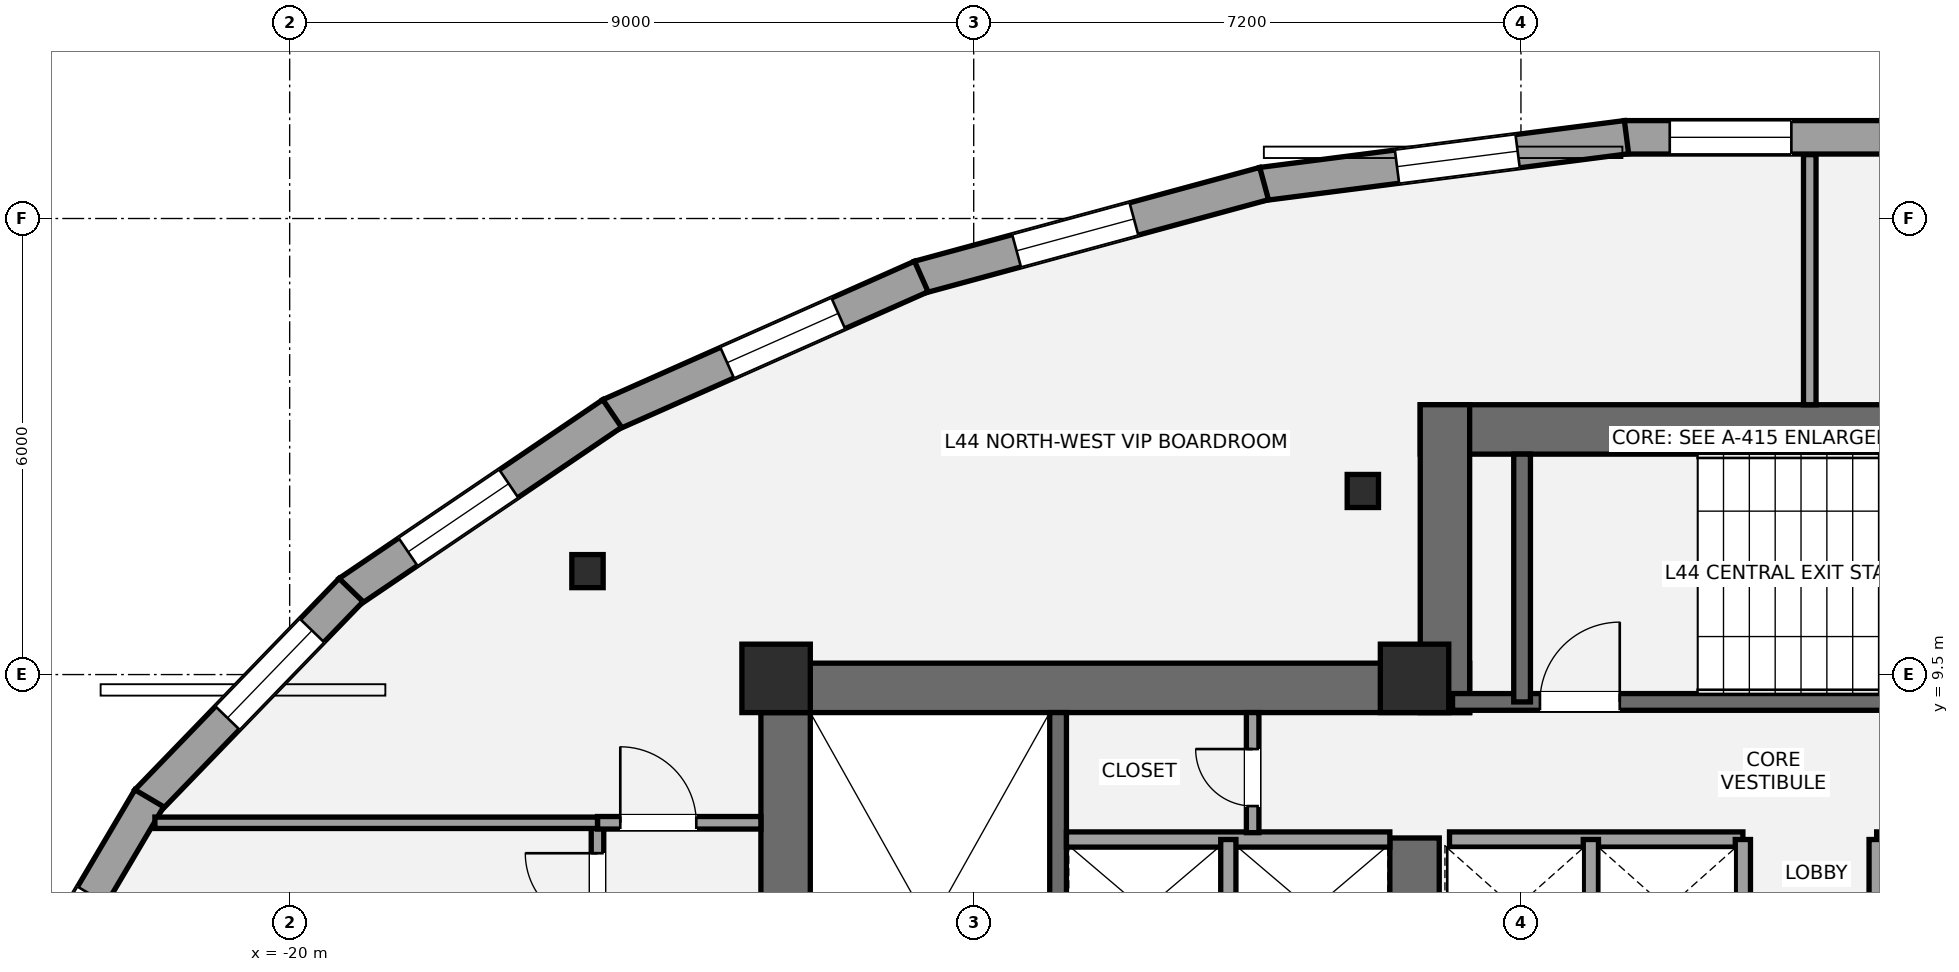
"""IFC4 building model, lengths in metres.
Left out: names, types, materials, properties, quantities, classifications, styles, units other than length and angle.
Written with IfcOpenShell. Run it as: python <this file> out.ifc"""

import sys

from ifc_helpers import new_model, si_unit, direction, frame, frame_2d, origin, origin_2d, place, context, subcontext, project, spatial, rectangle, i_section, extrude, element, fill, save


model = new_model("IFC4")
c1 = context("Model", 3, precision=1e-05, world=origin(), true_north=direction((0.0, 1.0)))
c2 = subcontext(c1, "Body", "Model", "MODEL_VIEW")
j1 = project(units=[si_unit("LENGTHUNIT", "METRE"), si_unit("PLANEANGLEUNIT", "RADIAN")], contexts=[c1])
p1 = place(None, origin())
s1 = spatial("IfcSite", under=j1, at=p1, CompositionType="ELEMENT")
p2 = place(p1, origin())
s2 = spatial("IfcBuilding", under=s1, at=p2, CompositionType="ELEMENT")
p3 = place(p2, frame((0.0, 0.0, 163.0)))
s3 = spatial("IfcBuildingStorey", under=s2, at=p3, CompositionType="ELEMENT", Elevation=163.0)
p4 = place(p3, frame((-13.475, 1.2, 0.0), z_axis=(0.0, 0.0, 1.0), x_axis=(0.0, 1.0, 0.0)))
e1 = element("IfcWall", 1, at=p4, inside=s3, PredefinedType="SHEAR", context=c2, shape_type="SweptSolid", body=[
    extrude(rectangle(XDim=8.45, YDim=0.65, at=frame_2d((4.225, 0.0))), origin(), (0.0, 0.0, 1.0), 3.2),
])
p5 = place(p3, frame((-13.8, 9.325, 0.0), z_axis=(0.0, 0.0, 1.0), x_axis=(1.0, 0.0, 0.0)))
e2 = element("IfcWall", 2, at=p5, inside=s3, PredefinedType="SHEAR", context=c2, shape_type="SweptSolid", body=[
    extrude(rectangle(XDim=9.325, YDim=0.65, at=frame_2d((4.663, 0.0))), origin(), (0.0, 0.0, 1.0), 3.2),
])
p6 = place(p3, frame((-5.2, 5.35, 0.0), z_axis=(0.0, 0.0, 1.0), x_axis=(0.0, 1.0, 0.0)))
e3 = element("IfcWall", 3, at=p6, inside=s3, PredefinedType="SHEAR", context=c2, shape_type="SweptSolid", body=[
    extrude(rectangle(XDim=2.0, YDim=0.65, at=frame_2d((1.0, 0.0))), origin(), (0.0, 0.0, 1.0), 3.2),
])
p7 = place(p3, frame((-9.89, 1.85, 0.0), z_axis=(0.0, 0.0, 1.0), x_axis=(0.0, 1.0, 0.0)))
e4 = element("IfcWall", 4, at=p7, inside=s3, PredefinedType="SHEAR", context=c2, shape_type="SweptSolid", body=[
    extrude(rectangle(XDim=7.15, YDim=0.22, at=frame_2d((3.575, 0.0))), origin(), (0.0, 0.0, 1.0), 3.2),
])
p8 = place(p3, frame((-5.125, 12.725, 0.0), z_axis=(0.0, 0.0, 1.0), x_axis=(1.0, 0.0, 0.0)))
e5 = element("IfcWall", 5, at=p8, inside=s3, PredefinedType="SHEAR", context=c2, shape_type="SweptSolid", body=[
    extrude(rectangle(XDim=10.25, YDim=0.65, at=frame_2d((5.125, 0.0))), origin(), (0.0, 0.0, 1.0), 3.2),
])
p9 = place(p3, frame((-4.8, 9.0, 0.0), z_axis=(0.0, 0.0, 1.0), x_axis=(0.0, 1.0, 0.0)))
e6 = element("IfcWall", 6, at=p9, inside=s3, PredefinedType="SHEAR", context=c2, shape_type="SweptSolid", body=[
    extrude(rectangle(XDim=4.05, YDim=0.65, at=frame_2d((2.025, 0.0))), origin(), (0.0, 0.0, 1.0), 3.2),
])
p10 = place(p3, frame((-4.7, 9.14, 0.0), z_axis=(0.0, 0.0, 1.0), x_axis=(1.0, 0.0, 0.0)))
e7 = element("IfcWall", 7, at=p10, inside=s3, PredefinedType="SHEAR", context=c2, shape_type="SweptSolid", body=[
    extrude(rectangle(XDim=9.3, YDim=0.22, at=frame_2d((4.65, 0.0))), origin(), (0.0, 0.0, 1.0), 3.2),
])
p11 = place(p10, frame((1.15, 0.0, 0.0)))
e8 = element("IfcOpeningElement", 8, at=p11, cuts=e7, PredefinedType="OPENING", context=c2, shape_type="SweptSolid", body=[
    extrude(rectangle(XDim=1.05, YDim=2.15, at=frame_2d((0.525, 1.075))), frame((0.0, 0.12, 0.0), z_axis=(0.0, -1.0, 0.0), x_axis=(1.0, 0.0, 0.0)), (0.0, 0.0, 1.0), 0.24),
])
p12 = place(p3, frame((-3.785, 9.14, 0.0), z_axis=(0.0, 0.0, 1.0), x_axis=(0.0, 1.0, 0.0)))
e9 = element("IfcWall", 9, at=p12, inside=s3, PredefinedType="SHEAR", context=c2, shape_type="SweptSolid", body=[
    extrude(rectangle(XDim=3.26, YDim=0.22, at=frame_2d((1.63, 0.0))), origin(), (0.0, 0.0, 1.0), 3.2),
])
for number, where, z_axis, x_axis in (
    (10, (-13.6, 9.45, 0.0), (0.0, 0.0, 1.0), (1.0, 0.0, 0.0)),
    (11, (-5.2, 9.45, 0.0), (0.0, 0.0, 1.0), (1.0, 0.0, 0.0)),
):
    element("IfcColumn", number, at=place(p3, frame(where, z_axis=z_axis, x_axis=x_axis)), inside=s3, PredefinedType="COLUMN", context=c2, shape_type="SweptSolid", body=[
        extrude(rectangle(XDim=0.9, YDim=0.9, at=origin_2d()), origin(), (0.0, 0.0, 1.0), 3.2),
    ])
for number, where, z_axis, x_axis in (
    (12, (-5.88, 11.915, 0.0), (0.0, 0.0, 1.0), (1.0, 0.0, 0.0)),
    (13, (-16.082, 10.861, 0.0), (0.0, 0.0, 1.0), (1.0, 0.0, 0.0)),
):
    element("IfcColumn", number, at=place(p3, frame(where, z_axis=z_axis, x_axis=x_axis)), inside=s3, PredefinedType="COLUMN", context=c2, shape_type="SweptSolid", body=[
        extrude(i_section(OverallWidth=0.412, OverallDepth=0.435, WebThickness=0.036, FlangeThickness=0.057, at=origin_2d()), origin(), (0.0, 0.0, 1.0), 3.2),
    ])
p13 = place(p3, frame((-2.439, 16.568, 0.0), z_axis=(0.0, 0.0, 1.0), x_axis=(1.0, 0.0, 0.0)))
e14 = element("IfcWall", 14, at=p13, inside=s3, PredefinedType="STANDARD", context=c2, shape_type="SweptSolid", body=[
    extrude(rectangle(XDim=4.878, YDim=0.44, at=frame_2d((2.439, 0.0))), origin(), (0.0, 0.0, 1.0), 2.315),
])
p14 = place(p13, frame((0.597, 0.0, 0.58)))
e15 = element("IfcOpeningElement", 15, at=p14, cuts=e14, PredefinedType="OPENING", context=c2, shape_type="SweptSolid", body=[
    extrude(rectangle(XDim=1.6, YDim=1.55, at=frame_2d((0.8, 0.775))), frame((0.0, 0.23, 0.0), z_axis=(0.0, -1.0, 0.0), x_axis=(1.0, 0.0, 0.0)), (0.0, 0.0, 1.0), 0.46),
])
p15 = place(p3, frame((-7.209, 15.954, 0.0), z_axis=(0.0, 0.0, 1.0), x_axis=(0.991852910824, 0.127388395426, 0.0)))
e16 = element("IfcWall", 16, at=p15, inside=s3, PredefinedType="STANDARD", context=c2, shape_type="SweptSolid", body=[
    extrude(rectangle(XDim=4.837, YDim=0.44, at=frame_2d((2.418, 0.0))), origin(), (0.0, 0.0, 1.0), 2.315),
])
p16 = place(p15, frame((1.793, 0.0, 0.58)))
e17 = element("IfcOpeningElement", 17, at=p16, cuts=e16, PredefinedType="OPENING", context=c2, shape_type="SweptSolid", body=[
    extrude(rectangle(XDim=1.6, YDim=1.55, at=frame_2d((0.8, 0.775))), frame((0.0, 0.23, 0.0), z_axis=(0.0, -1.0, 0.0), x_axis=(1.0, 0.0, 0.0)), (0.0, 0.0, 1.0), 0.46),
])
p17 = place(p3, frame((-11.721, 14.726, 0.0), z_axis=(0.0, 0.0, 1.0), x_axis=(0.965037424263, 0.262112132058, 0.0)))
e18 = element("IfcWall", 18, at=p17, inside=s3, PredefinedType="STANDARD", context=c2, shape_type="SweptSolid", body=[
    extrude(rectangle(XDim=4.707, YDim=0.44, at=frame_2d((2.353, 0.0))), origin(), (0.0, 0.0, 1.0), 2.315),
])
p18 = place(p17, frame((1.332, 0.0, 0.58)))
e19 = element("IfcOpeningElement", 19, at=p18, cuts=e18, PredefinedType="OPENING", context=c2, shape_type="SweptSolid", body=[
    extrude(rectangle(XDim=1.6, YDim=1.55, at=frame_2d((0.8, 0.775))), frame((0.0, 0.23, 0.0), z_axis=(0.0, -1.0, 0.0), x_axis=(1.0, 0.0, 0.0)), (0.0, 0.0, 1.0), 0.46),
])
p19 = place(p3, frame((-15.791, 12.916, 0.0), z_axis=(0.0, 0.0, 1.0), x_axis=(0.913907994914, 0.405921392431, 0.0)))
e20 = element("IfcWall", 20, at=p19, inside=s3, PredefinedType="STANDARD", context=c2, shape_type="SweptSolid", body=[
    extrude(rectangle(XDim=4.487, YDim=0.44, at=frame_2d((2.244, 0.0))), origin(), (0.0, 0.0, 1.0), 2.315),
])
p20 = place(p19, frame((1.692, 0.0, 0.58)))
e21 = element("IfcOpeningElement", 21, at=p20, cuts=e20, PredefinedType="OPENING", context=c2, shape_type="SweptSolid", body=[
    extrude(rectangle(XDim=1.6, YDim=1.55, at=frame_2d((0.8, 0.775))), frame((0.0, 0.23, 0.0), z_axis=(0.0, -1.0, 0.0), x_axis=(1.0, 0.0, 0.0)), (0.0, 0.0, 1.0), 0.46),
])
p21 = place(p3, frame((-19.227, 10.583, 0.0), z_axis=(0.0, 0.0, 1.0), x_axis=(0.827760762475, 0.561081206338, 0.0)))
e22 = element("IfcWall", 22, at=p21, inside=s3, PredefinedType="STANDARD", context=c2, shape_type="SweptSolid", body=[
    extrude(rectangle(XDim=4.192, YDim=0.44, at=frame_2d((2.096, 0.0))), origin(), (0.0, 0.0, 1.0), 2.315),
])
p22 = place(p21, frame((0.947, 0.0, 0.58)))
e23 = element("IfcOpeningElement", 23, at=p22, cuts=e22, PredefinedType="OPENING", context=c2, shape_type="SweptSolid", body=[
    extrude(rectangle(XDim=1.6, YDim=1.55, at=frame_2d((0.8, 0.775))), frame((0.0, 0.23, 0.0), z_axis=(0.0, -1.0, 0.0), x_axis=(1.0, 0.0, 0.0)), (0.0, 0.0, 1.0), 0.46),
])
p23 = place(p3, frame((-21.879, 7.832, 0.0), z_axis=(0.0, 0.0, 1.0), x_axis=(0.694975307772, 0.719033602544, 0.0)))
e24 = element("IfcWall", 24, at=p23, inside=s3, PredefinedType="STANDARD", context=c2, shape_type="SweptSolid", body=[
    extrude(rectangle(XDim=3.866, YDim=0.44, at=frame_2d((1.933, 0.0))), origin(), (0.0, 0.0, 1.0), 2.315),
])
p24 = place(p23, frame((1.526, 0.0, 0.58)))
e25 = element("IfcOpeningElement", 25, at=p24, cuts=e24, PredefinedType="OPENING", context=c2, shape_type="SweptSolid", body=[
    extrude(rectangle(XDim=1.6, YDim=1.55, at=frame_2d((0.8, 0.775))), frame((0.0, 0.23, 0.0), z_axis=(0.0, -1.0, 0.0), x_axis=(1.0, 0.0, 0.0)), (0.0, 0.0, 1.0), 0.46),
])
p25 = place(p3, frame((-23.667, 4.794, 0.0), z_axis=(0.0, 0.0, 1.0), x_axis=(0.508883387051, 0.860835465338, 0.0)))
e26 = element("IfcWall", 26, at=p25, inside=s3, PredefinedType="STANDARD", context=c2, shape_type="SweptSolid", body=[
    extrude(rectangle(XDim=3.577, YDim=0.44, at=frame_2d((1.788, 0.0))), origin(), (0.0, 0.0, 1.0), 2.315),
])
p26 = place(p25, frame((0.496, 0.0, 0.58)))
e27 = element("IfcOpeningElement", 27, at=p26, cuts=e26, PredefinedType="OPENING", context=c2, shape_type="SweptSolid", body=[
    extrude(rectangle(XDim=1.6, YDim=1.55, at=frame_2d((0.8, 0.775))), frame((0.0, 0.23, 0.0), z_axis=(0.0, -1.0, 0.0), x_axis=(1.0, 0.0, 0.0)), (0.0, 0.0, 1.0), 0.46),
])
p27 = place(p3, frame((-9.78, 7.33, 0.0), z_axis=(0.0, 0.0, 1.0), x_axis=(1.0, 0.0, 0.0)))
e28 = element("IfcWall", 28, at=p27, inside=s3, PredefinedType="SOLIDWALL", context=c2, shape_type="SweptSolid", body=[
    extrude(rectangle(XDim=4.255, YDim=0.2, at=frame_2d((2.127, 0.0))), origin(), (0.0, 0.0, 1.0), 3.02),
])
p28 = place(p3, frame((-7.65, 5.47, 0.0), z_axis=(0.0, 0.0, 1.0), x_axis=(0.0, 1.0, 0.0)))
e29 = element("IfcWall", 29, at=p28, inside=s3, PredefinedType="SOLIDWALL", context=c2, shape_type="SweptSolid", body=[
    extrude(rectangle(XDim=1.86, YDim=0.2, at=frame_2d((0.93, 0.0))), origin(), (0.0, 0.0, 1.0), 3.02),
])
for number, where, z_axis, x_axis in (
    (30, (-4.74, 7.33, 0.0), (0.0, 0.0, 1.0), (1.0, 0.0, 0.0)),
    (31, (0.88, 7.33, 0.0), (0.0, 0.0, 1.0), (1.0, 0.0, 0.0)),
):
    element("IfcWall", number, at=place(p3, frame(where, z_axis=z_axis, x_axis=x_axis)), inside=s3, PredefinedType="SOLIDWALL", context=c2, shape_type="SweptSolid", body=[
        extrude(rectangle(XDim=3.86, YDim=0.2, at=frame_2d((1.93, 0.0))), origin(), (0.0, 0.0, 1.0), 3.02),
    ])
for number, where, z_axis, x_axis in (
    (32, (-2.88, 5.52, 0.0), (0.0, 0.0, 1.0), (0.0, 1.0, 0.0)),
    (33, (-0.88, 5.52, 0.0), (0.0, 0.0, 1.0), (0.0, 1.0, 0.0)),
    (34, (0.88, 5.52, 0.0), (0.0, 0.0, 1.0), (0.0, 1.0, 0.0)),
):
    element("IfcWall", number, at=place(p3, frame(where, z_axis=z_axis, x_axis=x_axis)), inside=s3, PredefinedType="SOLIDWALL", context=c2, shape_type="SweptSolid", body=[
        extrude(rectangle(XDim=1.81, YDim=0.2, at=frame_2d((0.905, 0.0))), origin(), (0.0, 0.0, 1.0), 3.02),
    ])
p29 = place(p3, frame((-7.33, 7.42, 0.0), z_axis=(0.0, 0.0, 1.0), x_axis=(0.0, 1.0, 0.0)))
e35 = element("IfcWall", 35, at=p29, inside=s3, PredefinedType="PARTITIONING", context=c2, shape_type="SweptSolid", body=[
    extrude(rectangle(XDim=1.58, YDim=0.165, at=frame_2d((0.79, 0.0))), origin(), (0.0, 0.0, 1.0), 3.02),
])
p30 = place(p29, frame((0.35, 0.0, 0.0)))
e36 = element("IfcOpeningElement", 36, at=p30, cuts=e35, PredefinedType="OPENING", context=c2, shape_type="SweptSolid", body=[
    extrude(rectangle(XDim=0.75, YDim=2.1, at=frame_2d((0.375, 1.05))), frame((0.0, 0.093, 0.0), z_axis=(0.0, -1.0, 0.0), x_axis=(1.0, 0.0, 0.0)), (0.0, 0.0, 1.0), 0.185),
])
p31 = place(p3, frame((-15.95, -12.528, 0.0), z_axis=(0.0, 0.0, 1.0), x_axis=(0.0, 1.0, 0.0)))
e37 = element("IfcWall", 37, at=p31, inside=s3, PredefinedType="PARTITIONING", context=c2, shape_type="SweptSolid", body=[
    extrude(rectangle(XDim=20.078, YDim=0.165, at=frame_2d((10.039, 0.0))), origin(), (0.0, 0.0, 1.0), 2.473),
])
p32 = place(p31, frame((5.528, 0.0, 0.0)))
e38 = element("IfcOpeningElement", 38, at=p32, cuts=e37, PredefinedType="OPENING", context=c2, shape_type="SweptSolid", body=[
    extrude(rectangle(XDim=0.85, YDim=2.1, at=frame_2d((0.425, 1.05))), frame((0.0, 0.093, 0.0), z_axis=(0.0, -1.0, 0.0), x_axis=(1.0, 0.0, 0.0)), (0.0, 0.0, 1.0), 0.185),
])
p33 = place(p31, frame((12.978, 0.0, 0.0)))
e39 = element("IfcOpeningElement", 39, at=p33, cuts=e37, PredefinedType="OPENING", context=c2, shape_type="SweptSolid", body=[
    extrude(rectangle(XDim=0.95, YDim=2.15, at=frame_2d((0.475, 1.075))), frame((0.0, 0.093, 0.0), z_axis=(0.0, -1.0, 0.0), x_axis=(1.0, 0.0, 0.0)), (0.0, 0.0, 1.0), 0.185),
])
p34 = place(p31, frame((18.728, 0.0, 0.0)))
e40 = element("IfcOpeningElement", 40, at=p34, cuts=e37, PredefinedType="OPENING", context=c2, shape_type="SweptSolid", body=[
    extrude(rectangle(XDim=0.95, YDim=2.15, at=frame_2d((0.475, 1.075))), frame((0.0, 0.093, 0.0), z_axis=(0.0, -1.0, 0.0), x_axis=(1.0, 0.0, 0.0)), (0.0, 0.0, 1.0), 0.185),
])
p35 = place(p3, frame((-15.95, 7.55, 0.0), z_axis=(0.0, 0.0, 1.0), x_axis=(1.0, 0.0, 0.0)))
e41 = element("IfcWall", 41, at=p35, inside=s3, PredefinedType="PARTITIONING", context=c2, shape_type="SweptSolid", body=[
    extrude(rectangle(XDim=2.15, YDim=0.165, at=frame_2d((1.075, 0.0))), origin(), (0.0, 0.0, 1.0), 3.02),
])
p36 = place(p35, frame((0.3, 0.0, 0.0)))
e42 = element("IfcOpeningElement", 42, at=p36, cuts=e41, PredefinedType="OPENING", context=c2, shape_type="SweptSolid", body=[
    extrude(rectangle(XDim=1.0, YDim=2.15, at=frame_2d((0.5, 1.075))), frame((0.0, 0.093, 0.0), z_axis=(0.0, -1.0, 0.0), x_axis=(1.0, 0.0, 0.0)), (0.0, 0.0, 1.0), 0.185),
])
p37 = place(p3, frame((-21.773, 7.55, 0.0), z_axis=(0.0, 0.0, 1.0), x_axis=(1.0, 0.0, 0.0)))
e43 = element("IfcWall", 43, at=p37, inside=s3, PredefinedType="PLUMBINGWALL", context=c2, shape_type="SweptSolid", body=[
    extrude(rectangle(XDim=5.823, YDim=0.15, at=frame_2d((2.912, 0.0))), origin(), (0.0, 0.0, 1.0), 2.473),
])
p38 = place(p3, frame((0.0, 13.05, 0.0), z_axis=(0.0, 0.0, 1.0), x_axis=(0.0, 1.0, 0.0)))
e44 = element("IfcWall", 44, at=p38, inside=s3, PredefinedType="PARTITIONING", context=c2, shape_type="SweptSolid", body=[
    extrude(rectangle(XDim=3.29, YDim=0.165, at=frame_2d((1.645, 0.0))), origin(), (0.0, 0.0, 1.0), 3.02),
])
p39 = place(p14, origin())
e45 = element("IfcWindow", 45, at=p39, inside=s3, PartitioningType="SINGLE_PANEL", PredefinedType="WINDOW", context=c2, shape_type="SweptSolid", body=[
    extrude(rectangle(XDim=1.6, YDim=1.55, at=frame_2d((0.8, 0.775))), frame((0.0, -0.01, 0.0), z_axis=(0.0, -1.0, 0.0), x_axis=(1.0, 0.0, 0.0)), (0.0, 0.0, 1.0), 0.06),
])
fill(e15, e45)
p40 = place(p16, origin())
e46 = element("IfcWindow", 46, at=p40, inside=s3, PartitioningType="SINGLE_PANEL", PredefinedType="WINDOW", context=c2, shape_type="SweptSolid", body=[
    extrude(rectangle(XDim=1.6, YDim=1.55, at=frame_2d((0.8, 0.775))), frame((0.0, -0.01, 0.0), z_axis=(0.0, -1.0, 0.0), x_axis=(1.0, 0.0, 0.0)), (0.0, 0.0, 1.0), 0.06),
])
fill(e17, e46)
p41 = place(p18, origin())
e47 = element("IfcWindow", 47, at=p41, inside=s3, PartitioningType="SINGLE_PANEL", PredefinedType="WINDOW", context=c2, shape_type="SweptSolid", body=[
    extrude(rectangle(XDim=1.6, YDim=1.55, at=frame_2d((0.8, 0.775))), frame((0.0, -0.01, 0.0), z_axis=(0.0, -1.0, 0.0), x_axis=(1.0, 0.0, 0.0)), (0.0, 0.0, 1.0), 0.06),
])
fill(e19, e47)
p42 = place(p20, origin())
e48 = element("IfcWindow", 48, at=p42, inside=s3, PartitioningType="SINGLE_PANEL", PredefinedType="WINDOW", context=c2, shape_type="SweptSolid", body=[
    extrude(rectangle(XDim=1.6, YDim=1.55, at=frame_2d((0.8, 0.775))), frame((0.0, -0.01, 0.0), z_axis=(0.0, -1.0, 0.0), x_axis=(1.0, 0.0, 0.0)), (0.0, 0.0, 1.0), 0.06),
])
fill(e21, e48)
p43 = place(p22, origin())
e49 = element("IfcWindow", 49, at=p43, inside=s3, PartitioningType="SINGLE_PANEL", PredefinedType="WINDOW", context=c2, shape_type="SweptSolid", body=[
    extrude(rectangle(XDim=1.6, YDim=1.55, at=frame_2d((0.8, 0.775))), frame((0.0, -0.01, 0.0), z_axis=(0.0, -1.0, 0.0), x_axis=(1.0, 0.0, 0.0)), (0.0, 0.0, 1.0), 0.06),
])
fill(e23, e49)
p44 = place(p24, origin())
e50 = element("IfcWindow", 50, at=p44, inside=s3, PartitioningType="SINGLE_PANEL", PredefinedType="WINDOW", context=c2, shape_type="SweptSolid", body=[
    extrude(rectangle(XDim=1.6, YDim=1.55, at=frame_2d((0.8, 0.775))), frame((0.0, -0.01, 0.0), z_axis=(0.0, -1.0, 0.0), x_axis=(1.0, 0.0, 0.0)), (0.0, 0.0, 1.0), 0.06),
])
fill(e25, e50)
p45 = place(p11, origin())
e51 = element("IfcDoor", 51, at=p45, inside=s3, OperationType="SINGLE_SWING_RIGHT", PredefinedType="DOOR", context=c2, shape_type="SweptSolid", body=[
    extrude(rectangle(XDim=1.05, YDim=2.15, at=frame_2d((0.525, 1.075))), frame((0.0, 0.025, 0.0), z_axis=(0.0, -1.0, 0.0), x_axis=(1.0, 0.0, 0.0)), (0.0, 0.0, 1.0), 0.05),
])
fill(e8, e51)
p46 = place(p30, origin())
e52 = element("IfcDoor", 52, at=p46, inside=s3, OperationType="SINGLE_SWING_RIGHT", PredefinedType="DOOR", context=c2, shape_type="SweptSolid", body=[
    extrude(rectangle(XDim=0.75, YDim=2.1, at=frame_2d((0.375, 1.05))), frame((0.0, 0.025, 0.0), z_axis=(0.0, -1.0, 0.0), x_axis=(1.0, 0.0, 0.0)), (0.0, 0.0, 1.0), 0.05),
])
fill(e36, e52)
p47 = place(p36, origin())
e53 = element("IfcDoor", 53, at=p47, inside=s3, OperationType="SINGLE_SWING_LEFT", PredefinedType="DOOR", context=c2, shape_type="SweptSolid", body=[
    extrude(rectangle(XDim=1.0, YDim=2.15, at=frame_2d((0.5, 1.075))), frame((0.0, 0.025, 0.0), z_axis=(0.0, -1.0, 0.0), x_axis=(1.0, 0.0, 0.0)), (0.0, 0.0, 1.0), 0.05),
])
fill(e42, e53)
p48 = place(p34, origin())
e54 = element("IfcDoor", 54, at=p48, inside=s3, OperationType="SINGLE_SWING_RIGHT", PredefinedType="DOOR", context=c2, shape_type="SweptSolid", body=[
    extrude(rectangle(XDim=0.95, YDim=2.15, at=frame_2d((0.475, 1.075))), frame((0.0, 0.025, 0.0), z_axis=(0.0, -1.0, 0.0), x_axis=(1.0, 0.0, 0.0)), (0.0, 0.0, 1.0), 0.05),
])
fill(e40, e54)
save(model, sys.argv[1])
